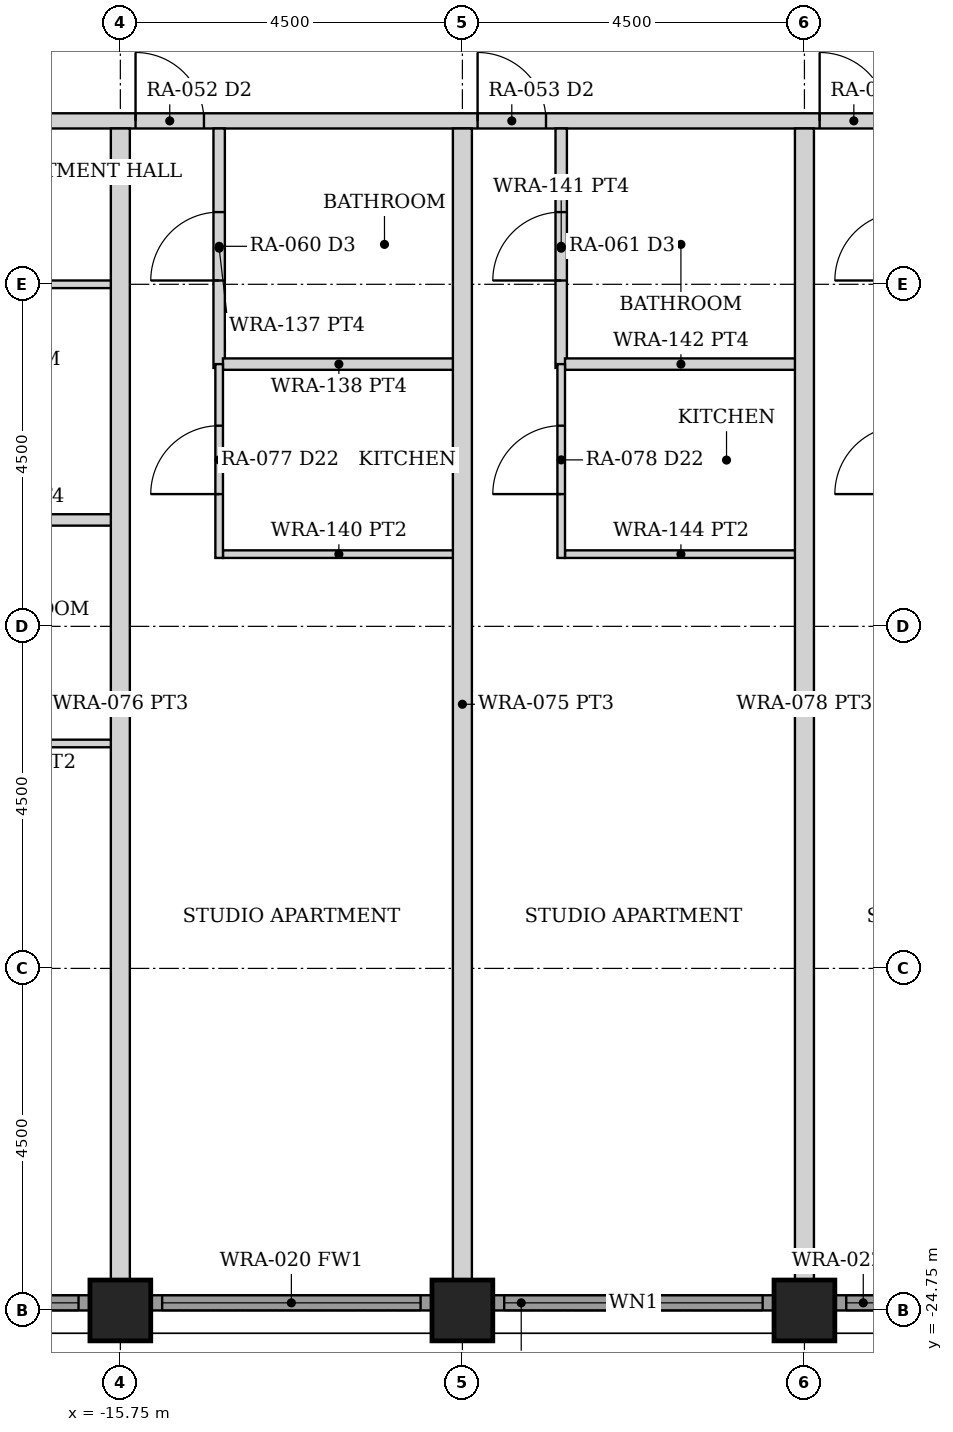
"""IFC4 building model, lengths in metres.
Left out: names, types, materials, properties, quantities, classifications, styles, units other than length and angle.
Written with IfcOpenShell. Run it as: python <this file> out.ifc"""

import sys

from ifc_helpers import new_model, si_unit, direction, frame, frame_2d, origin, origin_2d, place, context, subcontext, project, spatial, rectangle, hollow_rectangle, extrude, element, fill, save


model = new_model("IFC4")
c1 = context("Model", 3, precision=1e-05, world=origin(), true_north=direction((0.0, 1.0)))
c2 = subcontext(c1, "Body", "Model", "MODEL_VIEW")
j1 = project(units=[si_unit("LENGTHUNIT", "METRE"), si_unit("PLANEANGLEUNIT", "RADIAN")], contexts=[c1])
p1 = place(None, origin())
s1 = spatial("IfcSite", under=j1, at=p1, CompositionType="ELEMENT")
p2 = place(p1, origin())
s2 = spatial("IfcBuilding", under=s1, at=p2, CompositionType="ELEMENT")
p3 = place(p2, frame((0.0, 0.0, 26.5)))
s3 = spatial("IfcBuildingStorey", under=s2, at=p3, CompositionType="ELEMENT", Elevation=26.5)
for number, where, z_axis, x_axis in (
    (1, (-15.75, -24.75, 0.0), (0.0, 0.0, 1.0), (0.0, 1.0, 0.0)),
    (2, (-11.25, -24.75, 0.0), (0.0, 0.0, 1.0), (0.0, 1.0, 0.0)),
    (3, (-6.75, -24.75, 0.0), (0.0, 0.0, 1.0), (0.0, 1.0, 0.0)),
):
    element("IfcColumn", number, at=place(p3, frame(where, z_axis=z_axis, x_axis=x_axis)), inside=s3, PredefinedType="COLUMN", context=c2, shape_type="SweptSolid", body=[
        extrude(hollow_rectangle(XDim=0.8, YDim=0.8, WallThickness=0.08, at=origin_2d()), origin(), (0.0, 0.0, 1.0), 3.5),
    ])
p4 = place(p3, frame((-19.845, -24.65, 0.0), z_axis=(0.0, 0.0, 1.0), x_axis=(1.0, 0.0, 0.0)))
e4 = element("IfcWall", 4, at=p4, inside=s3, PredefinedType="SOLIDWALL", context=c2, shape_type="SweptSolid", body=[
    extrude(rectangle(XDim=3.69, YDim=0.2, at=frame_2d((1.845, 0.0))), origin(), (0.0, 0.0, 1.0), 2.379),
])
p5 = place(p4, frame((0.145, 0.0, 0.3)))
e5 = element("IfcOpeningElement", 5, at=p5, cuts=e4, PredefinedType="OPENING", context=c2, shape_type="SweptSolid", body=[
    extrude(rectangle(XDim=3.4, YDim=1.929, at=frame_2d((1.7, 0.964))), frame((0.0, 0.11, 0.0), z_axis=(0.0, -1.0, 0.0), x_axis=(1.0, 0.0, 0.0)), (0.0, 0.0, 1.0), 0.22),
])
p6 = place(p3, frame((-15.345, -24.65, 0.0), z_axis=(0.0, 0.0, 1.0), x_axis=(1.0, 0.0, 0.0)))
e6 = element("IfcWall", 6, at=p6, inside=s3, PredefinedType="SOLIDWALL", context=c2, shape_type="SweptSolid", body=[
    extrude(rectangle(XDim=3.69, YDim=0.2, at=frame_2d((1.845, 0.0))), origin(), (0.0, 0.0, 1.0), 2.379),
])
p7 = place(p6, frame((0.145, 0.0, 0.3)))
e7 = element("IfcOpeningElement", 7, at=p7, cuts=e6, PredefinedType="OPENING", context=c2, shape_type="SweptSolid", body=[
    extrude(rectangle(XDim=3.4, YDim=1.929, at=frame_2d((1.7, 0.964))), frame((0.0, 0.11, 0.0), z_axis=(0.0, -1.0, 0.0), x_axis=(1.0, 0.0, 0.0)), (0.0, 0.0, 1.0), 0.22),
])
p8 = place(p3, frame((-10.845, -24.65, 0.0), z_axis=(0.0, 0.0, 1.0), x_axis=(1.0, 0.0, 0.0)))
e8 = element("IfcWall", 8, at=p8, inside=s3, PredefinedType="SOLIDWALL", context=c2, shape_type="SweptSolid", body=[
    extrude(rectangle(XDim=3.69, YDim=0.2, at=frame_2d((1.845, 0.0))), origin(), (0.0, 0.0, 1.0), 2.379),
])
p9 = place(p8, frame((0.145, 0.0, 0.3)))
e9 = element("IfcOpeningElement", 9, at=p9, cuts=e8, PredefinedType="OPENING", context=c2, shape_type="SweptSolid", body=[
    extrude(rectangle(XDim=3.4, YDim=1.929, at=frame_2d((1.7, 0.964))), frame((0.0, 0.11, 0.0), z_axis=(0.0, -1.0, 0.0), x_axis=(1.0, 0.0, 0.0)), (0.0, 0.0, 1.0), 0.22),
])
p10 = place(p3, frame((-6.345, -24.65, 0.0), z_axis=(0.0, 0.0, 1.0), x_axis=(1.0, 0.0, 0.0)))
e10 = element("IfcWall", 10, at=p10, inside=s3, PredefinedType="SOLIDWALL", context=c2, shape_type="SweptSolid", body=[
    extrude(rectangle(XDim=3.69, YDim=0.2, at=frame_2d((1.845, 0.0))), origin(), (0.0, 0.0, 1.0), 2.379),
])
p11 = place(p10, frame((0.145, 0.0, 0.3)))
e11 = element("IfcOpeningElement", 11, at=p11, cuts=e10, PredefinedType="OPENING", context=c2, shape_type="SweptSolid", body=[
    extrude(rectangle(XDim=3.4, YDim=1.929, at=frame_2d((1.7, 0.964))), frame((0.0, 0.11, 0.0), z_axis=(0.0, -1.0, 0.0), x_axis=(1.0, 0.0, 0.0)), (0.0, 0.0, 1.0), 0.22),
])
p12 = place(p3, frame((-24.55, -9.1, 0.0), z_axis=(0.0, 0.0, 1.0), x_axis=(1.0, 0.0, 0.0)))
e12 = element("IfcWall", 12, at=p12, inside=s3, PredefinedType="PARTITIONING", context=c2, shape_type="SweptSolid", body=[
    extrude(rectangle(XDim=49.1, YDim=0.2, at=frame_2d((24.55, 0.0))), origin(), (0.0, 0.0, 1.0), 2.373),
])
p13 = place(p12, frame((5.1, 0.0, 0.0)))
e13 = element("IfcOpeningElement", 13, at=p13, cuts=e12, PredefinedType="OPENING", context=c2, shape_type="SweptSolid", body=[
    extrude(rectangle(XDim=0.9, YDim=2.1, at=frame_2d((0.45, 1.05))), frame((0.0, 0.11, 0.0), z_axis=(0.0, -1.0, 0.0), x_axis=(1.0, 0.0, 0.0)), (0.0, 0.0, 1.0), 0.22),
])
p14 = place(p12, frame((9.0, 0.0, 0.0)))
e14 = element("IfcOpeningElement", 14, at=p14, cuts=e12, PredefinedType="OPENING", context=c2, shape_type="SweptSolid", body=[
    extrude(rectangle(XDim=0.9, YDim=2.1, at=frame_2d((0.45, 1.05))), frame((0.0, 0.11, 0.0), z_axis=(0.0, -1.0, 0.0), x_axis=(1.0, 0.0, 0.0)), (0.0, 0.0, 1.0), 0.22),
])
p15 = place(p12, frame((13.5, 0.0, 0.0)))
e15 = element("IfcOpeningElement", 15, at=p15, cuts=e12, PredefinedType="OPENING", context=c2, shape_type="SweptSolid", body=[
    extrude(rectangle(XDim=0.9, YDim=2.1, at=frame_2d((0.45, 1.05))), frame((0.0, 0.11, 0.0), z_axis=(0.0, -1.0, 0.0), x_axis=(1.0, 0.0, 0.0)), (0.0, 0.0, 1.0), 0.22),
])
p16 = place(p12, frame((18.0, 0.0, 0.0)))
e16 = element("IfcOpeningElement", 16, at=p16, cuts=e12, PredefinedType="OPENING", context=c2, shape_type="SweptSolid", body=[
    extrude(rectangle(XDim=0.9, YDim=2.1, at=frame_2d((0.45, 1.05))), frame((0.0, 0.11, 0.0), z_axis=(0.0, -1.0, 0.0), x_axis=(1.0, 0.0, 0.0)), (0.0, 0.0, 1.0), 0.22),
])
p17 = place(p12, frame((22.5, 0.0, 0.0)))
e17 = element("IfcOpeningElement", 17, at=p17, cuts=e12, PredefinedType="OPENING", context=c2, shape_type="SweptSolid", body=[
    extrude(rectangle(XDim=0.9, YDim=2.1, at=frame_2d((0.45, 1.05))), frame((0.0, 0.11, 0.0), z_axis=(0.0, -1.0, 0.0), x_axis=(1.0, 0.0, 0.0)), (0.0, 0.0, 1.0), 0.22),
])
p18 = place(p12, frame((27.0, 0.0, 0.0)))
e18 = element("IfcOpeningElement", 18, at=p18, cuts=e12, PredefinedType="OPENING", context=c2, shape_type="SweptSolid", body=[
    extrude(rectangle(XDim=0.9, YDim=2.1, at=frame_2d((0.45, 1.05))), frame((0.0, 0.11, 0.0), z_axis=(0.0, -1.0, 0.0), x_axis=(1.0, 0.0, 0.0)), (0.0, 0.0, 1.0), 0.22),
])
p19 = place(p12, frame((31.5, 0.0, 0.0)))
e19 = element("IfcOpeningElement", 19, at=p19, cuts=e12, PredefinedType="OPENING", context=c2, shape_type="SweptSolid", body=[
    extrude(rectangle(XDim=0.9, YDim=2.1, at=frame_2d((0.45, 1.05))), frame((0.0, 0.11, 0.0), z_axis=(0.0, -1.0, 0.0), x_axis=(1.0, 0.0, 0.0)), (0.0, 0.0, 1.0), 0.22),
])
p20 = place(p12, frame((36.0, 0.0, 0.0)))
e20 = element("IfcOpeningElement", 20, at=p20, cuts=e12, PredefinedType="OPENING", context=c2, shape_type="SweptSolid", body=[
    extrude(rectangle(XDim=0.9, YDim=2.1, at=frame_2d((0.45, 1.05))), frame((0.0, 0.11, 0.0), z_axis=(0.0, -1.0, 0.0), x_axis=(1.0, 0.0, 0.0)), (0.0, 0.0, 1.0), 0.22),
])
p21 = place(p12, frame((43.1, 0.0, 0.0)))
e21 = element("IfcOpeningElement", 21, at=p21, cuts=e12, PredefinedType="OPENING", context=c2, shape_type="SweptSolid", body=[
    extrude(rectangle(XDim=0.9, YDim=2.1, at=frame_2d((0.45, 1.05))), frame((0.0, 0.11, 0.0), z_axis=(0.0, -1.0, 0.0), x_axis=(1.0, 0.0, 0.0)), (0.0, 0.0, 1.0), 0.22),
])
p22 = place(p3, frame((-24.35, -11.25, 0.0), z_axis=(0.0, 0.0, 1.0), x_axis=(1.0, 0.0, 0.0)))
e22 = element("IfcWall", 22, at=p22, inside=s3, PredefinedType="PARTITIONING", context=c2, shape_type="SweptSolid", body=[
    extrude(rectangle(XDim=8.5, YDim=0.1, at=frame_2d((4.25, 0.0))), origin(), (0.0, 0.0, 1.0), 2.373),
])
p23 = place(p22, frame((2.375, 0.0, 0.0)))
e23 = element("IfcOpeningElement", 23, at=p23, cuts=e22, PredefinedType="OPENING", context=c2, shape_type="SweptSolid", body=[
    extrude(rectangle(XDim=0.9, YDim=2.1, at=frame_2d((0.45, 1.05))), frame((0.0, 0.06, 0.0), z_axis=(0.0, -1.0, 0.0), x_axis=(1.0, 0.0, 0.0)), (0.0, 0.0, 1.0), 0.12),
])
p24 = place(p22, frame((0.35, 0.0, 0.0)))
e24 = element("IfcOpeningElement", 24, at=p24, cuts=e22, PredefinedType="OPENING", context=c2, shape_type="SweptSolid", body=[
    extrude(rectangle(XDim=0.9, YDim=2.1, at=frame_2d((0.45, 1.05))), frame((0.0, 0.06, 0.0), z_axis=(0.0, -1.0, 0.0), x_axis=(1.0, 0.0, 0.0)), (0.0, 0.0, 1.0), 0.12),
])
p25 = place(p22, frame((4.325, 0.0, 0.0)))
e25 = element("IfcOpeningElement", 25, at=p25, cuts=e22, PredefinedType="OPENING", context=c2, shape_type="SweptSolid", body=[
    extrude(rectangle(XDim=0.85, YDim=2.1, at=frame_2d((0.425, 1.05))), frame((0.0, 0.06, 0.0), z_axis=(0.0, -1.0, 0.0), x_axis=(1.0, 0.0, 0.0)), (0.0, 0.0, 1.0), 0.12),
])
p26 = place(p22, frame((6.52, 0.0, 0.0)))
e26 = element("IfcOpeningElement", 26, at=p26, cuts=e22, PredefinedType="OPENING", context=c2, shape_type="SweptSolid", body=[
    extrude(rectangle(XDim=0.9, YDim=2.1, at=frame_2d((0.45, 1.05))), frame((0.0, 0.06, 0.0), z_axis=(0.0, -1.0, 0.0), x_axis=(1.0, 0.0, 0.0)), (0.0, 0.0, 1.0), 0.12),
])
p27 = place(p3, frame((-18.95, -14.35, 0.0), z_axis=(0.0, 0.0, 1.0), x_axis=(1.0, 0.0, 0.0)))
e27 = element("IfcWall", 27, at=p27, inside=s3, PredefinedType="PARTITIONING", context=c2, shape_type="SweptSolid", body=[
    extrude(rectangle(XDim=3.14, YDim=0.15, at=frame_2d((1.57, 0.0))), origin(), (0.0, 0.0, 1.0), 2.373),
])
p28 = place(p3, frame((-18.95, -17.291, 0.0), z_axis=(0.0, 0.0, 1.0), x_axis=(1.0, 0.0, 0.0)))
e28 = element("IfcWall", 28, at=p28, inside=s3, PredefinedType="PARTITIONING", context=c2, shape_type="SweptSolid", body=[
    extrude(rectangle(XDim=3.14, YDim=0.1, at=frame_2d((1.57, 0.0))), origin(), (0.0, 0.0, 1.0), 2.373),
])
p29 = place(p3, frame((-14.45, -12.35, 0.0), z_axis=(0.0, 0.0, 1.0), x_axis=(0.0, 1.0, 0.0)))
e29 = element("IfcWall", 29, at=p29, inside=s3, PredefinedType="PARTITIONING", context=c2, shape_type="SweptSolid", body=[
    extrude(rectangle(XDim=3.15, YDim=0.15, at=frame_2d((1.575, 0.0))), origin(), (0.0, 0.0, 1.0), 2.373),
])
p30 = place(p29, frame((1.15, 0.0, 0.0)))
e30 = element("IfcOpeningElement", 30, at=p30, cuts=e29, PredefinedType="OPENING", context=c2, shape_type="SweptSolid", body=[
    extrude(rectangle(XDim=0.9, YDim=2.1, at=frame_2d((0.45, 1.05))), frame((0.0, 0.085, 0.0), z_axis=(0.0, -1.0, 0.0), x_axis=(1.0, 0.0, 0.0)), (0.0, 0.0, 1.0), 0.17),
])
p31 = place(p3, frame((-14.4, -12.3, 0.0), z_axis=(0.0, 0.0, 1.0), x_axis=(1.0, 0.0, 0.0)))
e31 = element("IfcWall", 31, at=p31, inside=s3, PredefinedType="PARTITIONING", context=c2, shape_type="SweptSolid", body=[
    extrude(rectangle(XDim=3.05, YDim=0.15, at=frame_2d((1.525, 0.0))), origin(), (0.0, 0.0, 1.0), 2.373),
])
p32 = place(p3, frame((-14.4, -14.8, 0.0), z_axis=(0.0, 0.0, 1.0), x_axis=(1.0, 0.0, 0.0)))
e32 = element("IfcWall", 32, at=p32, inside=s3, PredefinedType="PARTITIONING", context=c2, shape_type="SweptSolid", body=[
    extrude(rectangle(XDim=3.05, YDim=0.1, at=frame_2d((1.525, 0.0))), origin(), (0.0, 0.0, 1.0), 2.373),
])
p33 = place(p3, frame((-14.45, -14.85, 0.0), z_axis=(0.0, 0.0, 1.0), x_axis=(0.0, 1.0, 0.0)))
e33 = element("IfcWall", 33, at=p33, inside=s3, PredefinedType="PARTITIONING", context=c2, shape_type="SweptSolid", body=[
    extrude(rectangle(XDim=2.55, YDim=0.1, at=frame_2d((1.275, 0.0))), origin(), (0.0, 0.0, 1.0), 2.373),
])
p34 = place(p33, frame((0.84, 0.0, 0.0)))
e34 = element("IfcOpeningElement", 34, at=p34, cuts=e33, PredefinedType="OPENING", context=c2, shape_type="SweptSolid", body=[
    extrude(rectangle(XDim=0.9, YDim=2.1, at=frame_2d((0.45, 1.05))), frame((0.0, 0.06, 0.0), z_axis=(0.0, -1.0, 0.0), x_axis=(1.0, 0.0, 0.0)), (0.0, 0.0, 1.0), 0.12),
])
p35 = place(p3, frame((-9.95, -12.35, 0.0), z_axis=(0.0, 0.0, 1.0), x_axis=(0.0, 1.0, 0.0)))
e35 = element("IfcWall", 35, at=p35, inside=s3, PredefinedType="PARTITIONING", context=c2, shape_type="SweptSolid", body=[
    extrude(rectangle(XDim=3.15, YDim=0.15, at=frame_2d((1.575, 0.0))), origin(), (0.0, 0.0, 1.0), 2.373),
])
p36 = place(p35, frame((1.15, 0.0, 0.0)))
e36 = element("IfcOpeningElement", 36, at=p36, cuts=e35, PredefinedType="OPENING", context=c2, shape_type="SweptSolid", body=[
    extrude(rectangle(XDim=0.9, YDim=2.1, at=frame_2d((0.45, 1.05))), frame((0.0, 0.085, 0.0), z_axis=(0.0, -1.0, 0.0), x_axis=(1.0, 0.0, 0.0)), (0.0, 0.0, 1.0), 0.17),
])
p37 = place(p3, frame((-9.9, -12.3, 0.0), z_axis=(0.0, 0.0, 1.0), x_axis=(1.0, 0.0, 0.0)))
e37 = element("IfcWall", 37, at=p37, inside=s3, PredefinedType="PARTITIONING", context=c2, shape_type="SweptSolid", body=[
    extrude(rectangle(XDim=3.05, YDim=0.15, at=frame_2d((1.525, 0.0))), origin(), (0.0, 0.0, 1.0), 2.373),
])
p38 = place(p3, frame((-9.9, -14.8, 0.0), z_axis=(0.0, 0.0, 1.0), x_axis=(1.0, 0.0, 0.0)))
e38 = element("IfcWall", 38, at=p38, inside=s3, PredefinedType="PARTITIONING", context=c2, shape_type="SweptSolid", body=[
    extrude(rectangle(XDim=3.05, YDim=0.1, at=frame_2d((1.525, 0.0))), origin(), (0.0, 0.0, 1.0), 2.373),
])
p39 = place(p3, frame((-9.95, -14.85, 0.0), z_axis=(0.0, 0.0, 1.0), x_axis=(0.0, 1.0, 0.0)))
e39 = element("IfcWall", 39, at=p39, inside=s3, PredefinedType="PARTITIONING", context=c2, shape_type="SweptSolid", body=[
    extrude(rectangle(XDim=2.55, YDim=0.1, at=frame_2d((1.275, 0.0))), origin(), (0.0, 0.0, 1.0), 2.373),
])
p40 = place(p39, frame((0.84, 0.0, 0.0)))
e40 = element("IfcOpeningElement", 40, at=p40, cuts=e39, PredefinedType="OPENING", context=c2, shape_type="SweptSolid", body=[
    extrude(rectangle(XDim=0.9, YDim=2.1, at=frame_2d((0.45, 1.05))), frame((0.0, 0.06, 0.0), z_axis=(0.0, -1.0, 0.0), x_axis=(1.0, 0.0, 0.0)), (0.0, 0.0, 1.0), 0.12),
])
for number, where, z_axis, x_axis in (
    (41, (-15.75, -24.35, 0.0), (0.0, 0.0, 1.0), (0.0, 1.0, 0.0)),
    (42, (-11.25, -24.35, 0.0), (0.0, 0.0, 1.0), (0.0, 1.0, 0.0)),
    (43, (-6.75, -24.35, 0.0), (0.0, 0.0, 1.0), (0.0, 1.0, 0.0)),
):
    element("IfcWall", number, at=place(p3, frame(where, z_axis=z_axis, x_axis=x_axis)), inside=s3, PredefinedType="PARTITIONING", context=c2, shape_type="SweptSolid", body=[
        extrude(rectangle(XDim=15.15, YDim=0.25, at=frame_2d((7.575, 0.0))), origin(), (0.0, 0.0, 1.0), 2.373),
    ])
p41 = place(p5, origin())
e44 = element("IfcWindow", 44, at=p41, inside=s3, PartitioningType="SINGLE_PANEL", PredefinedType="WINDOW", context=c2, shape_type="SweptSolid", body=[
    extrude(rectangle(XDim=3.4, YDim=1.929, at=frame_2d((1.7, 0.964))), frame((0.0, 0.03, 0.0), z_axis=(0.0, -1.0, 0.0), x_axis=(1.0, 0.0, 0.0)), (0.0, 0.0, 1.0), 0.06),
])
fill(e5, e44)
p42 = place(p7, origin())
e45 = element("IfcWindow", 45, at=p42, inside=s3, PartitioningType="SINGLE_PANEL", PredefinedType="WINDOW", context=c2, shape_type="SweptSolid", body=[
    extrude(rectangle(XDim=3.4, YDim=1.929, at=frame_2d((1.7, 0.964))), frame((0.0, 0.03, 0.0), z_axis=(0.0, -1.0, 0.0), x_axis=(1.0, 0.0, 0.0)), (0.0, 0.0, 1.0), 0.06),
])
fill(e7, e45)
p43 = place(p9, origin())
e46 = element("IfcWindow", 46, at=p43, inside=s3, PartitioningType="SINGLE_PANEL", PredefinedType="WINDOW", context=c2, shape_type="SweptSolid", body=[
    extrude(rectangle(XDim=3.4, YDim=1.929, at=frame_2d((1.7, 0.964))), frame((0.0, 0.03, 0.0), z_axis=(0.0, -1.0, 0.0), x_axis=(1.0, 0.0, 0.0)), (0.0, 0.0, 1.0), 0.06),
])
fill(e9, e46)
p44 = place(p11, origin())
e47 = element("IfcWindow", 47, at=p44, inside=s3, PartitioningType="SINGLE_PANEL", PredefinedType="WINDOW", context=c2, shape_type="SweptSolid", body=[
    extrude(rectangle(XDim=3.4, YDim=1.929, at=frame_2d((1.7, 0.964))), frame((0.0, 0.03, 0.0), z_axis=(0.0, -1.0, 0.0), x_axis=(1.0, 0.0, 0.0)), (0.0, 0.0, 1.0), 0.06),
])
fill(e11, e47)
p45 = place(p14, origin())
e48 = element("IfcDoor", 48, at=p45, inside=s3, OperationType="SINGLE_SWING_LEFT", PredefinedType="DOOR", context=c2, shape_type="SweptSolid", body=[
    extrude(rectangle(XDim=0.9, YDim=2.1, at=frame_2d((0.45, 1.05))), frame((0.0, 0.025, 0.0), z_axis=(0.0, -1.0, 0.0), x_axis=(1.0, 0.0, 0.0)), (0.0, 0.0, 1.0), 0.05),
])
fill(e14, e48)
p46 = place(p30, origin())
e49 = element("IfcDoor", 49, at=p46, inside=s3, OperationType="SINGLE_SWING_LEFT", PredefinedType="DOOR", context=c2, shape_type="SweptSolid", body=[
    extrude(rectangle(XDim=0.9, YDim=2.1, at=frame_2d((0.45, 1.05))), frame((0.0, 0.025, 0.0), z_axis=(0.0, -1.0, 0.0), x_axis=(1.0, 0.0, 0.0)), (0.0, 0.0, 1.0), 0.05),
])
fill(e30, e49)
p47 = place(p34, origin())
e50 = element("IfcDoor", 50, at=p47, inside=s3, OperationType="SINGLE_SWING_LEFT", PredefinedType="DOOR", context=c2, shape_type="SweptSolid", body=[
    extrude(rectangle(XDim=0.9, YDim=2.1, at=frame_2d((0.45, 1.05))), frame((0.0, 0.025, 0.0), z_axis=(0.0, -1.0, 0.0), x_axis=(1.0, 0.0, 0.0)), (0.0, 0.0, 1.0), 0.05),
])
fill(e34, e50)
p48 = place(p15, origin())
e51 = element("IfcDoor", 51, at=p48, inside=s3, OperationType="SINGLE_SWING_LEFT", PredefinedType="DOOR", context=c2, shape_type="SweptSolid", body=[
    extrude(rectangle(XDim=0.9, YDim=2.1, at=frame_2d((0.45, 1.05))), frame((0.0, 0.025, 0.0), z_axis=(0.0, -1.0, 0.0), x_axis=(1.0, 0.0, 0.0)), (0.0, 0.0, 1.0), 0.05),
])
fill(e15, e51)
p49 = place(p36, origin())
e52 = element("IfcDoor", 52, at=p49, inside=s3, OperationType="SINGLE_SWING_LEFT", PredefinedType="DOOR", context=c2, shape_type="SweptSolid", body=[
    extrude(rectangle(XDim=0.9, YDim=2.1, at=frame_2d((0.45, 1.05))), frame((0.0, 0.025, 0.0), z_axis=(0.0, -1.0, 0.0), x_axis=(1.0, 0.0, 0.0)), (0.0, 0.0, 1.0), 0.05),
])
fill(e36, e52)
p50 = place(p40, origin())
e53 = element("IfcDoor", 53, at=p50, inside=s3, OperationType="SINGLE_SWING_LEFT", PredefinedType="DOOR", context=c2, shape_type="SweptSolid", body=[
    extrude(rectangle(XDim=0.9, YDim=2.1, at=frame_2d((0.45, 1.05))), frame((0.0, 0.025, 0.0), z_axis=(0.0, -1.0, 0.0), x_axis=(1.0, 0.0, 0.0)), (0.0, 0.0, 1.0), 0.05),
])
fill(e40, e53)
p51 = place(p16, origin())
e54 = element("IfcDoor", 54, at=p51, inside=s3, OperationType="SINGLE_SWING_LEFT", PredefinedType="DOOR", context=c2, shape_type="SweptSolid", body=[
    extrude(rectangle(XDim=0.9, YDim=2.1, at=frame_2d((0.45, 1.05))), frame((0.0, 0.025, 0.0), z_axis=(0.0, -1.0, 0.0), x_axis=(1.0, 0.0, 0.0)), (0.0, 0.0, 1.0), 0.05),
])
fill(e16, e54)
save(model, sys.argv[1])
